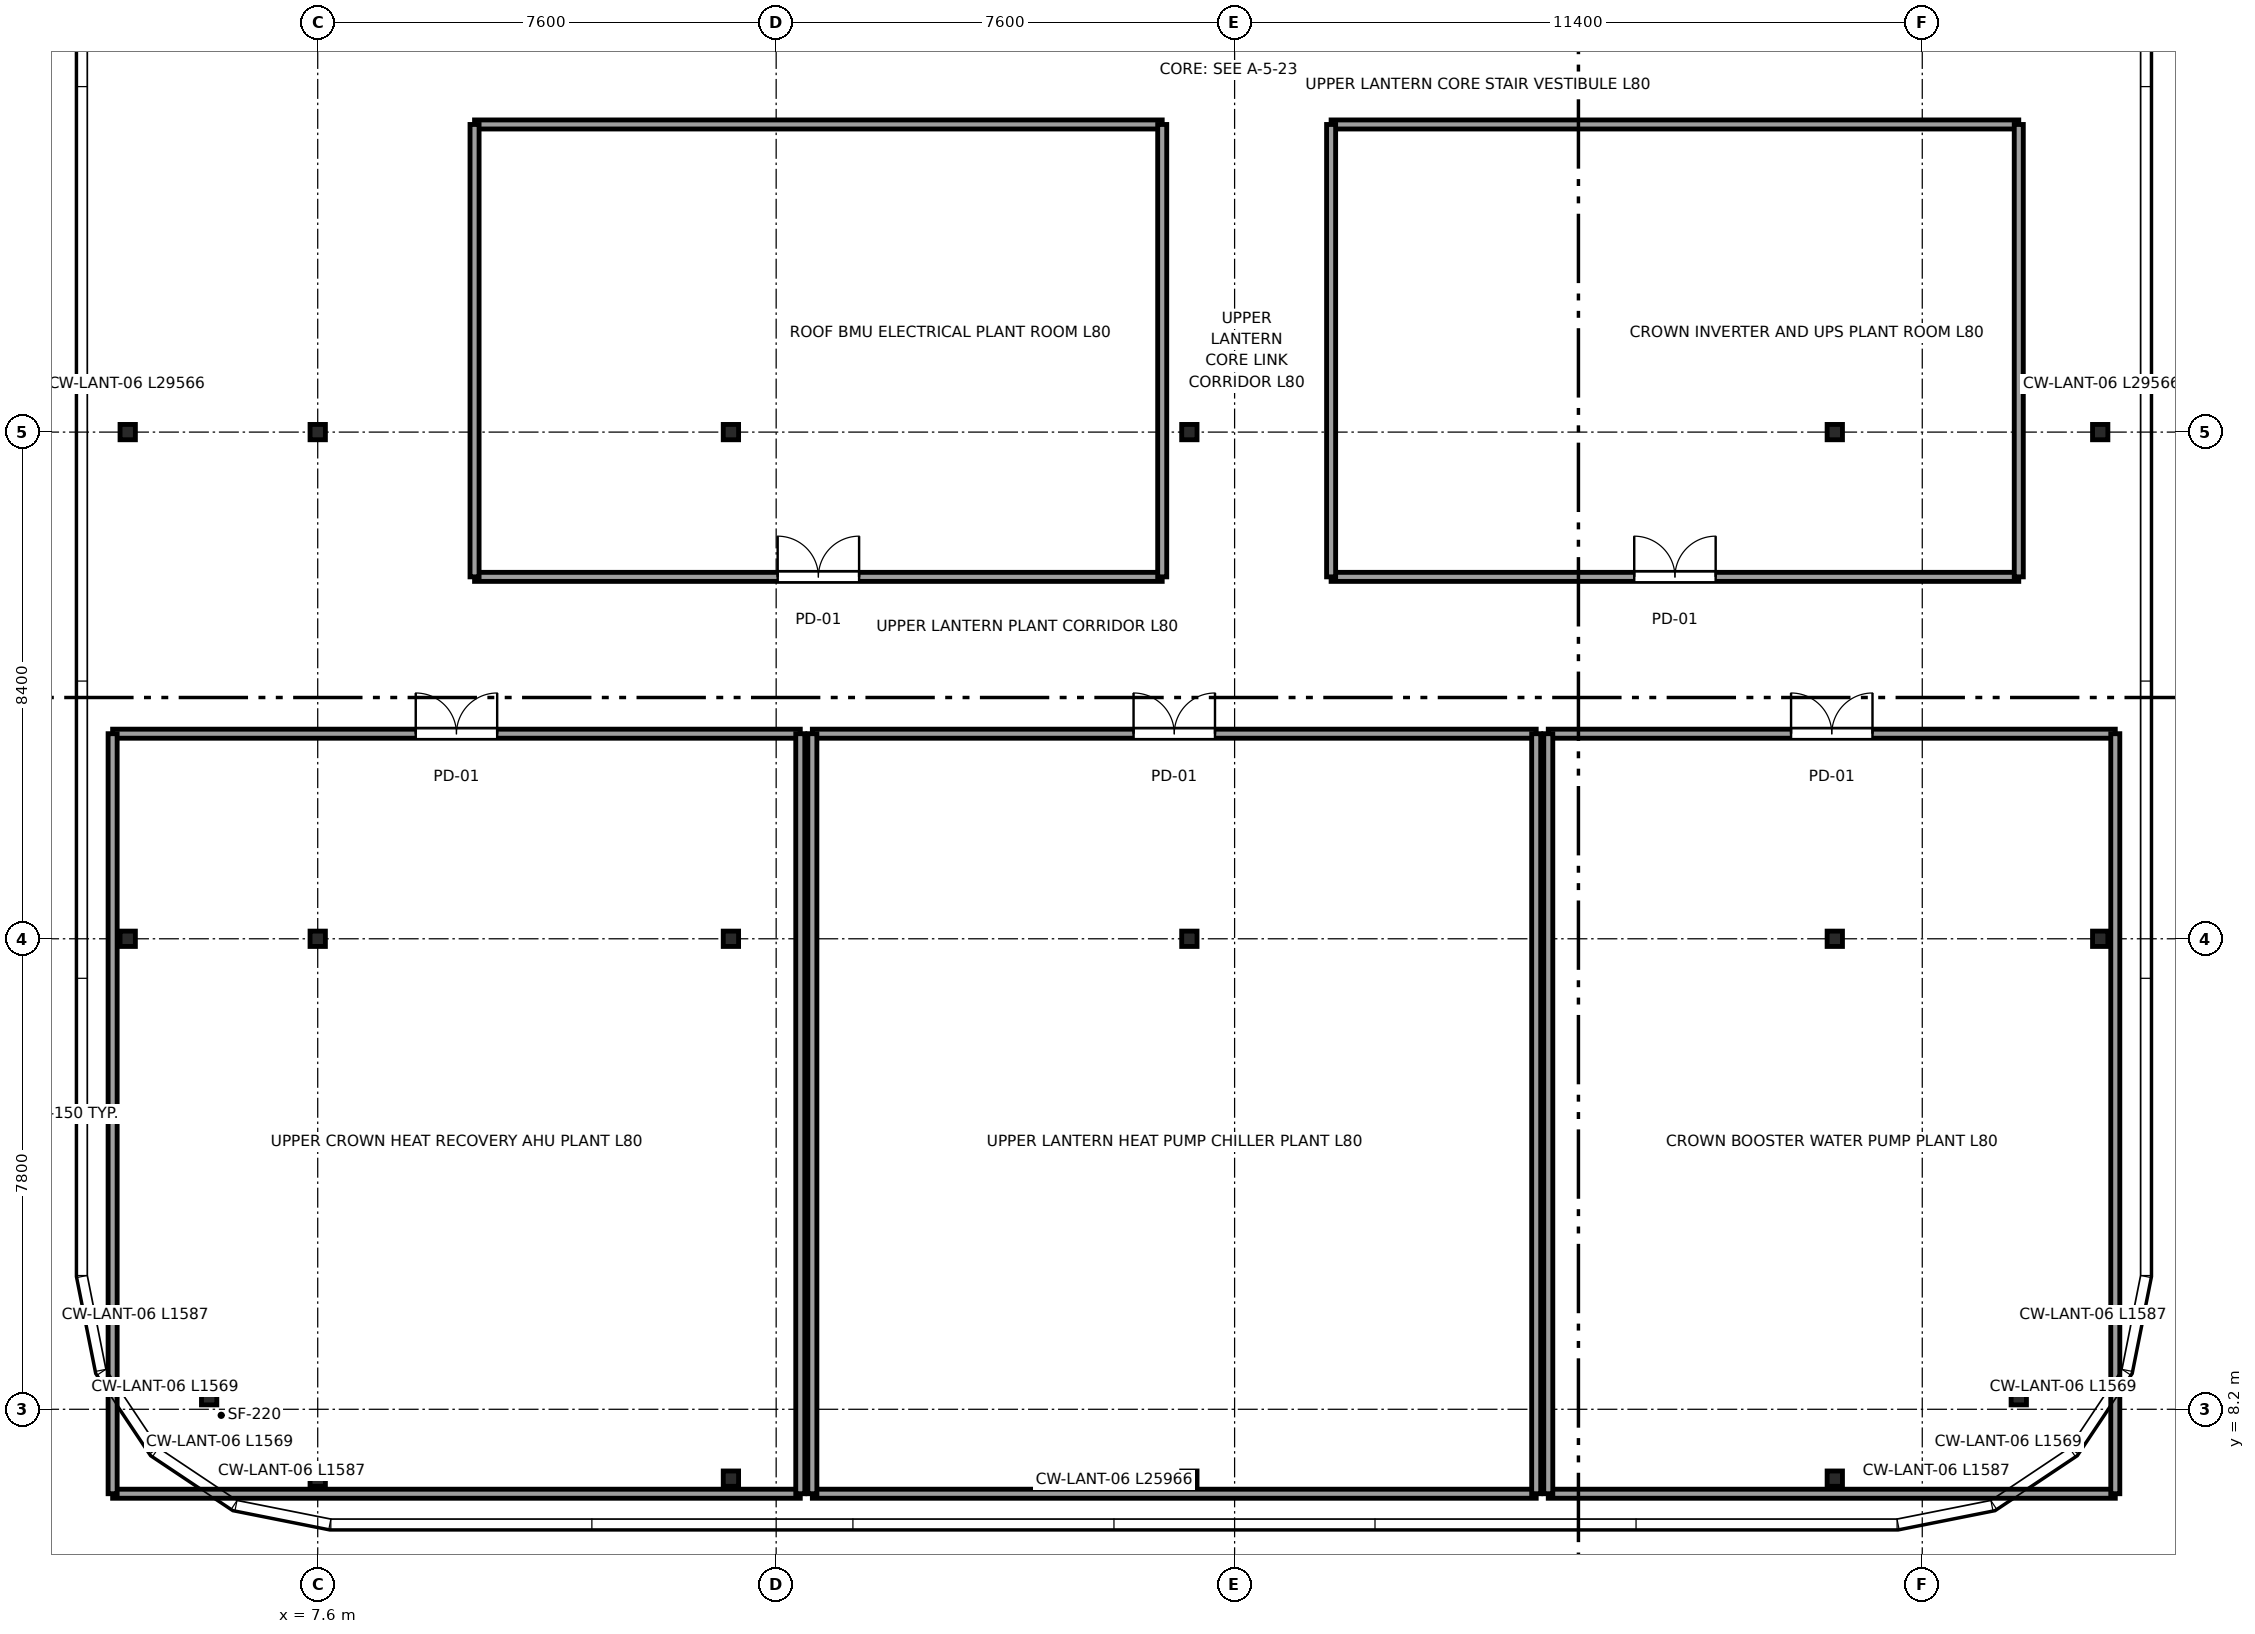
"""IFC4 building model, lengths in metres.
Left out: names, types, materials, properties, quantities, classifications, styles, units other than length and angle.
Written with IfcOpenShell. Run it as: python <this file> out.ifc"""

import sys

from ifc_helpers import new_model, si_unit, direction, frame, frame_2d, origin, origin_2d, place, context, subcontext, project, spatial, rectangle, i_section, extrude, source, transform, mapped, element, fill, save


model = new_model("IFC4")
c1 = context("Model", 3, precision=1e-05, world=origin(), true_north=direction((0.0, 1.0)))
c2 = subcontext(c1, "Body", "Model", "MODEL_VIEW")
j1 = project(units=[si_unit("LENGTHUNIT", "METRE"), si_unit("PLANEANGLEUNIT", "RADIAN")], contexts=[c1])
p1 = place(None, origin())
s1 = spatial("IfcSite", under=j1, at=p1, CompositionType="ELEMENT")
p2 = place(p1, origin())
s2 = spatial("IfcBuilding", under=s1, at=p2, CompositionType="ELEMENT")
p3 = place(p2, frame((0.0, 0.0, 302.35)))
s3 = spatial("IfcBuildingStorey", under=s2, at=p3, CompositionType="ELEMENT", Elevation=302.35)
m1 = source(origin(), c2, "Body", "SweptSolid", [
    extrude(i_section(OverallWidth=0.254, OverallDepth=0.254, WebThickness=0.009, FlangeThickness=0.014, FilletRadius=0.014, at=origin_2d()), origin(), (0.0, 0.0, 1.0), 3.8),
])
for number, where, z_axis, x_axis in (
    (1, (5.8, 8.4, 0.0), (0.0, 0.0, 1.0), (1.0, 0.0, 0.0)),
    (2, (4.45, 16.0, 0.0), (0.0, 0.0, 1.0), (1.0, 0.0, 0.0)),
    (3, (4.45, 24.4, 0.0), (0.0, 0.0, 1.0), (1.0, 0.0, 0.0)),
    (4, (7.6, 7.05, 0.0), (0.0, 0.0, 1.0), (1.0, 0.0, 0.0)),
    (5, (7.6, 16.0, 0.0), (0.0, 0.0, 1.0), (1.0, 0.0, 0.0)),
    (6, (7.6, 24.4, 0.0), (0.0, 0.0, 1.0), (1.0, 0.0, 0.0)),
    (7, (14.45, 7.05, 0.0), (0.0, 0.0, 1.0), (1.0, 0.0, 0.0)),
    (8, (14.45, 16.0, 0.0), (0.0, 0.0, 1.0), (1.0, 0.0, 0.0)),
    (9, (14.45, 24.4, 0.0), (0.0, 0.0, 1.0), (1.0, 0.0, 0.0)),
    (10, (22.05, 7.05, 0.0), (0.0, 0.0, 1.0), (1.0, 0.0, 0.0)),
    (11, (22.05, 16.0, 0.0), (0.0, 0.0, 1.0), (1.0, 0.0, 0.0)),
    (12, (22.05, 24.4, 0.0), (0.0, 0.0, 1.0), (1.0, 0.0, 0.0)),
    (13, (32.75, 7.05, 0.0), (0.0, 0.0, 1.0), (1.0, 0.0, 0.0)),
    (14, (32.75, 16.0, 0.0), (0.0, 0.0, 1.0), (1.0, 0.0, 0.0)),
    (15, (32.75, 24.4, 0.0), (0.0, 0.0, 1.0), (1.0, 0.0, 0.0)),
    (16, (35.8, 8.4, 0.0), (0.0, 0.0, 1.0), (1.0, 0.0, 0.0)),
    (17, (37.15, 16.0, 0.0), (0.0, 0.0, 1.0), (1.0, 0.0, 0.0)),
    (18, (37.15, 24.4, 0.0), (0.0, 0.0, 1.0), (1.0, 0.0, 0.0)),
):
    element("IfcColumn", number, at=place(p3, frame(where, z_axis=z_axis, x_axis=x_axis)), inside=s3, PredefinedType="COLUMN", context=c2, shape_type="MappedRepresentation", body=[
        mapped(m1, transform((0.0, 0.0, 0.0), x_axis=(1.0, 0.0, 0.0), y_axis=(0.0, 1.0, 0.0), z_axis=(0.0, 0.0, 1.0), scale=1.0)),
    ])
p4 = place(p3, frame((4.2, 6.8, 0.0), z_axis=(0.0, 0.0, 1.0), x_axis=(1.0, 0.0, 0.0)))
e19 = element("IfcWall", 19, at=p4, inside=s3, PredefinedType="PARTITIONING", context=c2, shape_type="SweptSolid", body=[
    extrude(rectangle(XDim=11.4, YDim=0.15, at=frame_2d((5.7, 0.0))), origin(), (0.0, 0.0, 1.0), 3.58),
])
p5 = place(p3, frame((4.2, 19.4, 0.0), z_axis=(0.0, 0.0, 1.0), x_axis=(1.0, 0.0, 0.0)))
e20 = element("IfcWall", 20, at=p5, inside=s3, PredefinedType="PARTITIONING", context=c2, shape_type="SweptSolid", body=[
    extrude(rectangle(XDim=11.4, YDim=0.15, at=frame_2d((5.7, 0.0))), origin(), (0.0, 0.0, 1.0), 3.58),
])
p6 = place(p5, frame((5.025, 0.0, 0.0)))
e21 = element("IfcOpeningElement", 21, at=p6, cuts=e20, PredefinedType="OPENING", context=c2, shape_type="SweptSolid", body=[
    extrude(rectangle(XDim=1.35, YDim=2.15, at=frame_2d((0.675, 1.075))), frame((0.0, 0.085, 0.0), z_axis=(0.0, -1.0, 0.0), x_axis=(1.0, 0.0, 0.0)), (0.0, 0.0, 1.0), 0.17),
])
for number, where, z_axis, x_axis in (
    (22, (4.2, 6.8, 0.0), (0.0, 0.0, 1.0), (0.0, 1.0, 0.0)),
    (23, (15.6, 6.8, 0.0), (0.0, 0.0, 1.0), (0.0, 1.0, 0.0)),
):
    element("IfcWall", number, at=place(p3, frame(where, z_axis=z_axis, x_axis=x_axis)), inside=s3, PredefinedType="PARTITIONING", context=c2, shape_type="SweptSolid", body=[
        extrude(rectangle(XDim=12.6, YDim=0.15, at=frame_2d((6.3, 0.0))), origin(), (0.0, 0.0, 1.0), 3.58),
    ])
p7 = place(p3, frame((15.8, 6.8, 0.0), z_axis=(0.0, 0.0, 1.0), x_axis=(1.0, 0.0, 0.0)))
e24 = element("IfcWall", 24, at=p7, inside=s3, PredefinedType="PARTITIONING", context=c2, shape_type="SweptSolid", body=[
    extrude(rectangle(XDim=12.0, YDim=0.15, at=frame_2d((6.0, 0.0))), origin(), (0.0, 0.0, 1.0), 3.58),
])
p8 = place(p3, frame((15.8, 19.4, 0.0), z_axis=(0.0, 0.0, 1.0), x_axis=(1.0, 0.0, 0.0)))
e25 = element("IfcWall", 25, at=p8, inside=s3, PredefinedType="PARTITIONING", context=c2, shape_type="SweptSolid", body=[
    extrude(rectangle(XDim=12.0, YDim=0.15, at=frame_2d((6.0, 0.0))), origin(), (0.0, 0.0, 1.0), 3.58),
])
p9 = place(p8, frame((5.325, 0.0, 0.0)))
e26 = element("IfcOpeningElement", 26, at=p9, cuts=e25, PredefinedType="OPENING", context=c2, shape_type="SweptSolid", body=[
    extrude(rectangle(XDim=1.35, YDim=2.15, at=frame_2d((0.675, 1.075))), frame((0.0, 0.085, 0.0), z_axis=(0.0, -1.0, 0.0), x_axis=(1.0, 0.0, 0.0)), (0.0, 0.0, 1.0), 0.17),
])
for number, where, z_axis, x_axis in (
    (27, (15.8, 6.8, 0.0), (0.0, 0.0, 1.0), (0.0, 1.0, 0.0)),
    (28, (27.8, 6.8, 0.0), (0.0, 0.0, 1.0), (0.0, 1.0, 0.0)),
):
    element("IfcWall", number, at=place(p3, frame(where, z_axis=z_axis, x_axis=x_axis)), inside=s3, PredefinedType="PARTITIONING", context=c2, shape_type="SweptSolid", body=[
        extrude(rectangle(XDim=12.6, YDim=0.15, at=frame_2d((6.3, 0.0))), origin(), (0.0, 0.0, 1.0), 3.58),
    ])
p10 = place(p3, frame((28.0, 6.8, 0.0), z_axis=(0.0, 0.0, 1.0), x_axis=(1.0, 0.0, 0.0)))
e29 = element("IfcWall", 29, at=p10, inside=s3, PredefinedType="PARTITIONING", context=c2, shape_type="SweptSolid", body=[
    extrude(rectangle(XDim=9.4, YDim=0.15, at=frame_2d((4.7, 0.0))), origin(), (0.0, 0.0, 1.0), 3.58),
])
p11 = place(p3, frame((28.0, 19.4, 0.0), z_axis=(0.0, 0.0, 1.0), x_axis=(1.0, 0.0, 0.0)))
e30 = element("IfcWall", 30, at=p11, inside=s3, PredefinedType="PARTITIONING", context=c2, shape_type="SweptSolid", body=[
    extrude(rectangle(XDim=9.4, YDim=0.15, at=frame_2d((4.7, 0.0))), origin(), (0.0, 0.0, 1.0), 3.58),
])
p12 = place(p11, frame((4.025, 0.0, 0.0)))
e31 = element("IfcOpeningElement", 31, at=p12, cuts=e30, PredefinedType="OPENING", context=c2, shape_type="SweptSolid", body=[
    extrude(rectangle(XDim=1.35, YDim=2.15, at=frame_2d((0.675, 1.075))), frame((0.0, 0.085, 0.0), z_axis=(0.0, -1.0, 0.0), x_axis=(1.0, 0.0, 0.0)), (0.0, 0.0, 1.0), 0.17),
])
for number, where, z_axis, x_axis in (
    (32, (28.0, 6.8, 0.0), (0.0, 0.0, 1.0), (0.0, 1.0, 0.0)),
    (33, (37.4, 6.8, 0.0), (0.0, 0.0, 1.0), (0.0, 1.0, 0.0)),
):
    element("IfcWall", number, at=place(p3, frame(where, z_axis=z_axis, x_axis=x_axis)), inside=s3, PredefinedType="PARTITIONING", context=c2, shape_type="SweptSolid", body=[
        extrude(rectangle(XDim=12.6, YDim=0.15, at=frame_2d((6.3, 0.0))), origin(), (0.0, 0.0, 1.0), 3.58),
    ])
p13 = place(p3, frame((10.2, 22.0, 0.0), z_axis=(0.0, 0.0, 1.0), x_axis=(1.0, 0.0, 0.0)))
e34 = element("IfcWall", 34, at=p13, inside=s3, PredefinedType="PARTITIONING", context=c2, shape_type="SweptSolid", body=[
    extrude(rectangle(XDim=11.4, YDim=0.15, at=frame_2d((5.7, 0.0))), origin(), (0.0, 0.0, 1.0), 3.58),
])
p14 = place(p13, frame((5.025, 0.0, 0.0)))
e35 = element("IfcOpeningElement", 35, at=p14, cuts=e34, PredefinedType="OPENING", context=c2, shape_type="SweptSolid", body=[
    extrude(rectangle(XDim=1.35, YDim=2.15, at=frame_2d((0.675, 1.075))), frame((0.0, 0.085, 0.0), z_axis=(0.0, -1.0, 0.0), x_axis=(1.0, 0.0, 0.0)), (0.0, 0.0, 1.0), 0.17),
])
p15 = place(p3, frame((10.2, 29.5, 0.0), z_axis=(0.0, 0.0, 1.0), x_axis=(1.0, 0.0, 0.0)))
e36 = element("IfcWall", 36, at=p15, inside=s3, PredefinedType="PARTITIONING", context=c2, shape_type="SweptSolid", body=[
    extrude(rectangle(XDim=11.4, YDim=0.15, at=frame_2d((5.7, 0.0))), origin(), (0.0, 0.0, 1.0), 3.58),
])
for number, where, z_axis, x_axis in (
    (37, (10.2, 22.0, 0.0), (0.0, 0.0, 1.0), (0.0, 1.0, 0.0)),
    (38, (21.6, 22.0, 0.0), (0.0, 0.0, 1.0), (0.0, 1.0, 0.0)),
):
    element("IfcWall", number, at=place(p3, frame(where, z_axis=z_axis, x_axis=x_axis)), inside=s3, PredefinedType="PARTITIONING", context=c2, shape_type="SweptSolid", body=[
        extrude(rectangle(XDim=7.5, YDim=0.15, at=frame_2d((3.75, 0.0))), origin(), (0.0, 0.0, 1.0), 3.58),
    ])
p16 = place(p3, frame((24.4, 22.0, 0.0), z_axis=(0.0, 0.0, 1.0), x_axis=(1.0, 0.0, 0.0)))
e39 = element("IfcWall", 39, at=p16, inside=s3, PredefinedType="PARTITIONING", context=c2, shape_type="SweptSolid", body=[
    extrude(rectangle(XDim=11.4, YDim=0.15, at=frame_2d((5.7, 0.0))), origin(), (0.0, 0.0, 1.0), 3.58),
])
p17 = place(p16, frame((5.025, 0.0, 0.0)))
e40 = element("IfcOpeningElement", 40, at=p17, cuts=e39, PredefinedType="OPENING", context=c2, shape_type="SweptSolid", body=[
    extrude(rectangle(XDim=1.35, YDim=2.15, at=frame_2d((0.675, 1.075))), frame((0.0, 0.085, 0.0), z_axis=(0.0, -1.0, 0.0), x_axis=(1.0, 0.0, 0.0)), (0.0, 0.0, 1.0), 0.17),
])
p18 = place(p3, frame((24.4, 29.5, 0.0), z_axis=(0.0, 0.0, 1.0), x_axis=(1.0, 0.0, 0.0)))
e41 = element("IfcWall", 41, at=p18, inside=s3, PredefinedType="PARTITIONING", context=c2, shape_type="SweptSolid", body=[
    extrude(rectangle(XDim=11.4, YDim=0.15, at=frame_2d((5.7, 0.0))), origin(), (0.0, 0.0, 1.0), 3.58),
])
for number, where, z_axis, x_axis in (
    (42, (24.4, 22.0, 0.0), (0.0, 0.0, 1.0), (0.0, 1.0, 0.0)),
    (43, (35.8, 22.0, 0.0), (0.0, 0.0, 1.0), (0.0, 1.0, 0.0)),
):
    element("IfcWall", number, at=place(p3, frame(where, z_axis=z_axis, x_axis=x_axis)), inside=s3, PredefinedType="PARTITIONING", context=c2, shape_type="SweptSolid", body=[
        extrude(rectangle(XDim=7.5, YDim=0.15, at=frame_2d((3.75, 0.0))), origin(), (0.0, 0.0, 1.0), 3.58),
    ])
m2 = source(origin(), c2, "Body", "SweptSolid", [
    extrude(rectangle(XDim=1.35, YDim=2.15, at=frame_2d((0.675, 1.075))), frame((0.0, 0.025, 0.0), z_axis=(0.0, -1.0, 0.0), x_axis=(1.0, 0.0, 0.0)), (0.0, 0.0, 1.0), 0.05),
])
p19 = place(p6, origin())
e44 = element("IfcDoor", 44, at=p19, inside=s3, OperationType="DOUBLE_DOOR_SINGLE_SWING", PredefinedType="DOOR", context=c2, shape_type="MappedRepresentation", body=[
    mapped(m2, transform((0.0, 0.0, 0.0), x_axis=(1.0, 0.0, 0.0), y_axis=(0.0, 1.0, 0.0), z_axis=(0.0, 0.0, 1.0), scale=1.0)),
])
fill(e21, e44)
p20 = place(p9, origin())
e45 = element("IfcDoor", 45, at=p20, inside=s3, OperationType="DOUBLE_DOOR_SINGLE_SWING", PredefinedType="DOOR", context=c2, shape_type="MappedRepresentation", body=[
    mapped(m2, transform((0.0, 0.0, 0.0), x_axis=(1.0, 0.0, 0.0), y_axis=(0.0, 1.0, 0.0), z_axis=(0.0, 0.0, 1.0), scale=1.0)),
])
fill(e26, e45)
p21 = place(p12, origin())
e46 = element("IfcDoor", 46, at=p21, inside=s3, OperationType="DOUBLE_DOOR_SINGLE_SWING", PredefinedType="DOOR", context=c2, shape_type="MappedRepresentation", body=[
    mapped(m2, transform((0.0, 0.0, 0.0), x_axis=(1.0, 0.0, 0.0), y_axis=(0.0, 1.0, 0.0), z_axis=(0.0, 0.0, 1.0), scale=1.0)),
])
fill(e31, e46)
p22 = place(p14, origin())
e47 = element("IfcDoor", 47, at=p22, inside=s3, OperationType="DOUBLE_DOOR_SINGLE_SWING", PredefinedType="DOOR", context=c2, shape_type="MappedRepresentation", body=[
    mapped(m2, transform((0.0, 0.0, 0.0), x_axis=(1.0, 0.0, 0.0), y_axis=(0.0, 1.0, 0.0), z_axis=(0.0, 0.0, 1.0), scale=1.0)),
])
fill(e35, e47)
p23 = place(p17, origin())
e48 = element("IfcDoor", 48, at=p23, inside=s3, OperationType="DOUBLE_DOOR_SINGLE_SWING", PredefinedType="DOOR", context=c2, shape_type="MappedRepresentation", body=[
    mapped(m2, transform((0.0, 0.0, 0.0), x_axis=(1.0, 0.0, 0.0), y_axis=(0.0, 1.0, 0.0), z_axis=(0.0, 0.0, 1.0), scale=1.0)),
])
fill(e40, e48)
save(model, sys.argv[1])
